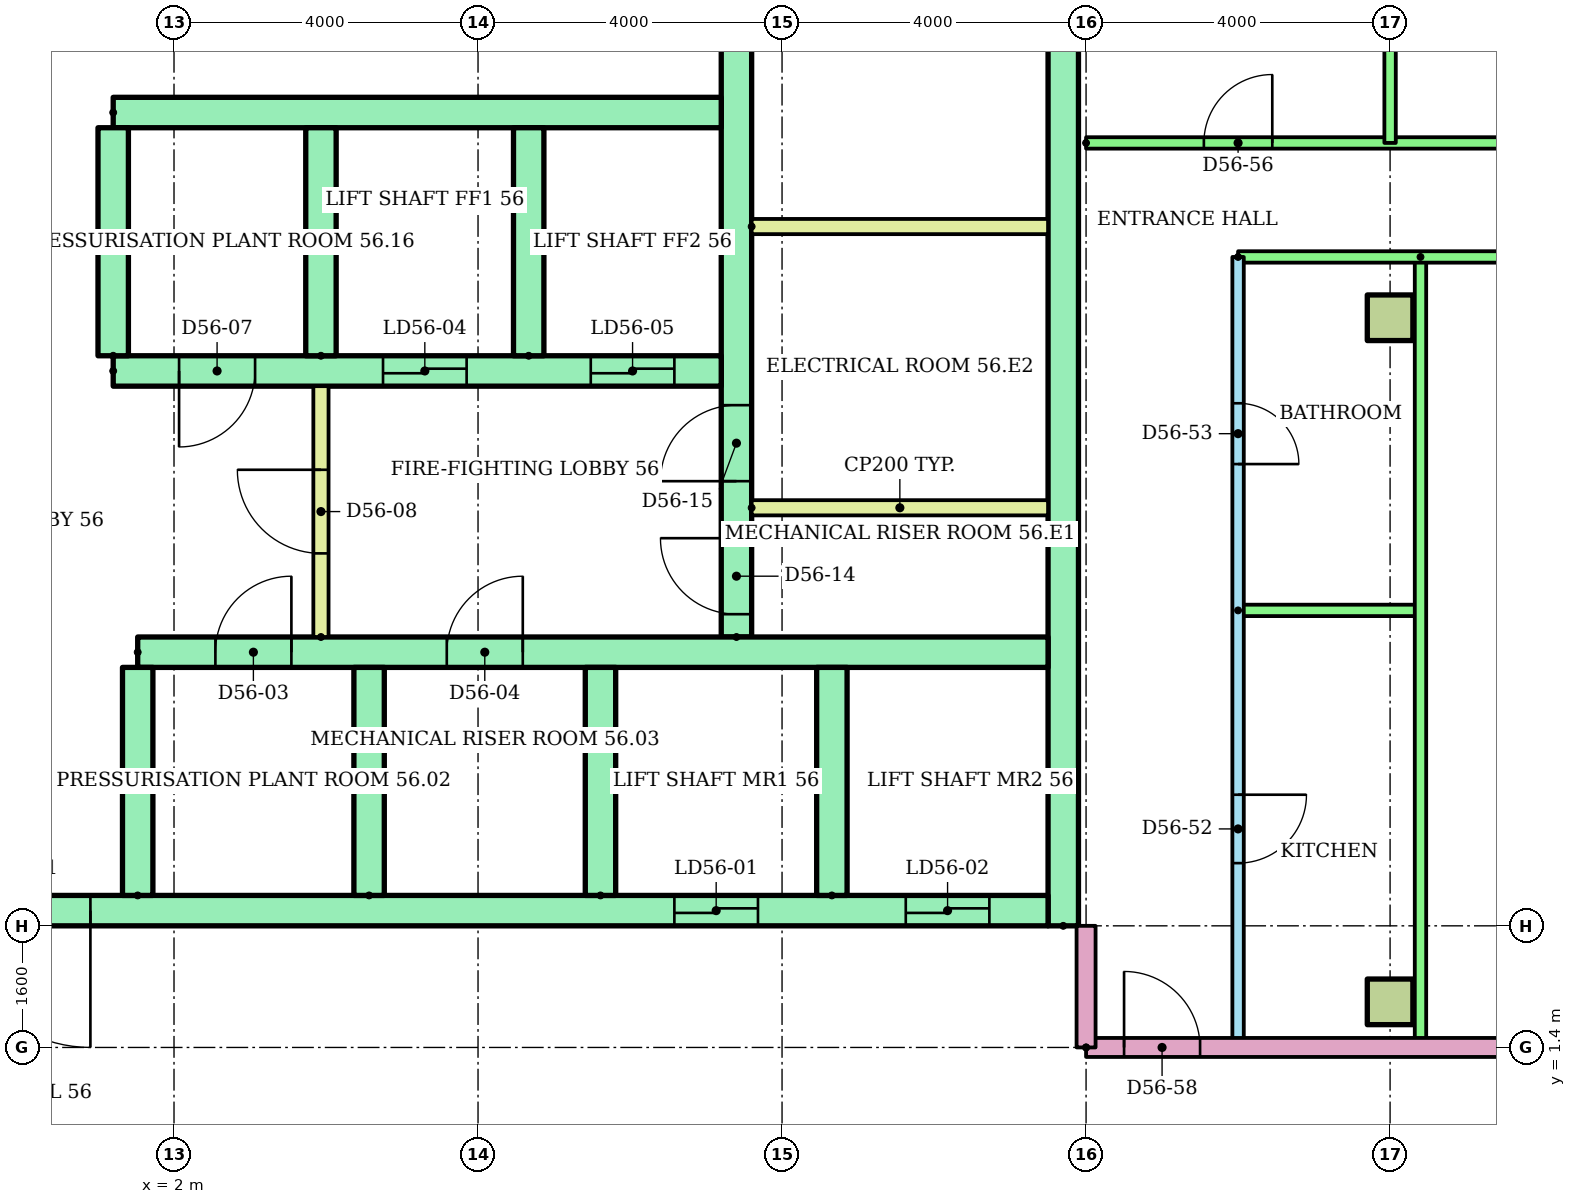
"""IFC4 building model, lengths in metres.
Left out: names, types, materials, properties, quantities, classifications, styles, units other than length and angle.
Written with IfcOpenShell. Run it as: python <this file> out.ifc"""

import sys

from ifc_helpers import new_model, si_unit, direction, frame, frame_2d, origin, origin_2d, place, context, subcontext, project, spatial, rectangle, extrude, element, fill, save


model = new_model("IFC4")
c1 = context("Model", 3, precision=1e-05, world=origin(), true_north=direction((0.0, 1.0)))
c2 = subcontext(c1, "Body", "Model", "MODEL_VIEW")
j1 = project(units=[si_unit("LENGTHUNIT", "METRE"), si_unit("PLANEANGLEUNIT", "RADIAN")], contexts=[c1])
p1 = place(None, origin())
s1 = spatial("IfcSite", under=j1, at=p1, CompositionType="ELEMENT")
p2 = place(p1, origin())
s2 = spatial("IfcBuilding", under=s1, at=p2, CompositionType="ELEMENT")
p3 = place(p2, frame((0.0, 0.0, 217.2)))
s3 = spatial("IfcBuildingStorey", under=s2, at=p3, CompositionType="ELEMENT", Elevation=217.2)
for number, where in (
    (1, (18.0, 2.0, 0.0)),
    (2, (18.0, 11.0, 0.0)),
):
    element("IfcColumn", number, at=place(p3, frame(where)), inside=s3, PredefinedType="COLUMN", context=c2, shape_type="SweptSolid", body=[
        extrude(rectangle(XDim=0.6, YDim=0.6, at=origin_2d()), origin(), (0.0, 0.0, 1.0), 3.2),
    ])
p4 = place(p3, frame((13.7, 3.0, 0.0), z_axis=(0.0, 0.0, 1.0), x_axis=(0.0, 1.0, 0.0)))
e3 = element("IfcWall", 3, at=p4, inside=s3, PredefinedType="SHEAR", context=c2, shape_type="SweptSolid", body=[
    extrude(rectangle(XDim=17.0, YDim=0.4, at=frame_2d((8.5, 0.0))), origin(), (0.0, 0.0, 1.0), 2.92),
])
p5 = place(p3, frame((9.4, 6.8, 0.0), z_axis=(0.0, 0.0, 1.0), x_axis=(0.0, 1.0, 0.0)))
e4 = element("IfcWall", 4, at=p5, inside=s3, PredefinedType="SHEAR", context=c2, shape_type="SweptSolid", body=[
    extrude(rectangle(XDim=12.7, YDim=0.4, at=frame_2d((6.35, 0.0))), origin(), (0.0, 0.0, 1.0), 2.92),
])
p6 = place(p5, frame((0.3, 0.0, 0.0)))
e5 = element("IfcOpeningElement", 5, at=p6, cuts=e4, PredefinedType="OPENING", context=c2, shape_type="SweptSolid", body=[
    extrude(rectangle(XDim=1.0, YDim=2.1, at=frame_2d((0.5, 1.05))), frame((0.0, 0.21, 0.0), z_axis=(0.0, -1.0, 0.0), x_axis=(1.0, 0.0, 0.0)), (0.0, 0.0, 1.0), 0.42),
])
p7 = place(p5, frame((2.05, 0.0, 0.0)))
e6 = element("IfcOpeningElement", 6, at=p7, cuts=e4, PredefinedType="OPENING", context=c2, shape_type="SweptSolid", body=[
    extrude(rectangle(XDim=1.0, YDim=2.1, at=frame_2d((0.5, 1.05))), frame((0.0, 0.21, 0.0), z_axis=(0.0, -1.0, 0.0), x_axis=(1.0, 0.0, 0.0)), (0.0, 0.0, 1.0), 0.42),
])
p8 = place(p5, frame((7.925, 0.0, 0.0)))
e7 = element("IfcOpeningElement", 7, at=p8, cuts=e4, PredefinedType="OPENING", context=c2, shape_type="SweptSolid", body=[
    extrude(rectangle(XDim=1.0, YDim=2.1, at=frame_2d((0.5, 1.05))), frame((0.0, 0.21, 0.0), z_axis=(0.0, -1.0, 0.0), x_axis=(1.0, 0.0, 0.0)), (0.0, 0.0, 1.0), 0.42),
])
p9 = place(p3, frame((-13.5, 3.2, 0.0)))
e8 = element("IfcWall", 8, at=p9, inside=s3, PredefinedType="SHEAR", context=c2, shape_type="SweptSolid", body=[
    extrude(rectangle(XDim=27.0, YDim=0.4, at=frame_2d((13.5, 0.0))), origin(), (0.0, 0.0, 1.0), 2.92),
])
p10 = place(p9, frame((22.083, 0.0, 0.0)))
e9 = element("IfcOpeningElement", 9, at=p10, cuts=e8, PredefinedType="OPENING", context=c2, shape_type="SweptSolid", body=[
    extrude(rectangle(XDim=1.1, YDim=2.1, at=frame_2d((0.55, 1.05))), frame((0.0, 0.21, 0.0), z_axis=(0.0, -1.0, 0.0), x_axis=(1.0, 0.0, 0.0)), (0.0, 0.0, 1.0), 0.42),
])
p11 = place(p9, frame((25.128, 0.0, 0.0)))
e10 = element("IfcOpeningElement", 10, at=p11, cuts=e8, PredefinedType="OPENING", context=c2, shape_type="SweptSolid", body=[
    extrude(rectangle(XDim=1.1, YDim=2.1, at=frame_2d((0.55, 1.05))), frame((0.0, 0.21, 0.0), z_axis=(0.0, -1.0, 0.0), x_axis=(1.0, 0.0, 0.0)), (0.0, 0.0, 1.0), 0.42),
])
p12 = place(p9, frame((12.6, 0.0, 0.0)))
e11 = element("IfcOpeningElement", 11, at=p12, cuts=e8, PredefinedType="OPENING", context=c2, shape_type="SweptSolid", body=[
    extrude(rectangle(XDim=1.8, YDim=2.1, at=frame_2d((0.9, 1.05))), frame((0.0, 0.21, 0.0), z_axis=(0.0, -1.0, 0.0), x_axis=(1.0, 0.0, 0.0)), (0.0, 0.0, 1.0), 0.42),
])
p13 = place(p3, frame((1.522, 6.6, 0.0)))
e12 = element("IfcWall", 12, at=p13, inside=s3, PredefinedType="SHEAR", context=c2, shape_type="SweptSolid", body=[
    extrude(rectangle(XDim=11.978, YDim=0.4, at=frame_2d((5.989, 0.0))), origin(), (0.0, 0.0, 1.0), 2.92),
])
p14 = place(p13, frame((1.022, 0.0, 0.0)))
e13 = element("IfcOpeningElement", 13, at=p14, cuts=e12, PredefinedType="OPENING", context=c2, shape_type="SweptSolid", body=[
    extrude(rectangle(XDim=1.0, YDim=2.1, at=frame_2d((0.5, 1.05))), frame((0.0, 0.21, 0.0), z_axis=(0.0, -1.0, 0.0), x_axis=(1.0, 0.0, 0.0)), (0.0, 0.0, 1.0), 0.42),
])
p15 = place(p13, frame((4.067, 0.0, 0.0)))
e14 = element("IfcOpeningElement", 14, at=p15, cuts=e12, PredefinedType="OPENING", context=c2, shape_type="SweptSolid", body=[
    extrude(rectangle(XDim=1.0, YDim=2.1, at=frame_2d((0.5, 1.05))), frame((0.0, 0.21, 0.0), z_axis=(0.0, -1.0, 0.0), x_axis=(1.0, 0.0, 0.0)), (0.0, 0.0, 1.0), 0.42),
])
for number, where, z_axis, x_axis in (
    (15, (1.522, 3.4, 0.0), (0.0, 0.0, 1.0), (0.0, 1.0, 0.0)),
    (16, (4.567, 3.4, 0.0), (0.0, 0.0, 1.0), (0.0, 1.0, 0.0)),
    (17, (7.611, 3.4, 0.0), (0.0, 0.0, 1.0), (0.0, 1.0, 0.0)),
    (18, (10.656, 3.4, 0.0), (0.0, 0.0, 1.0), (0.0, 1.0, 0.0)),
):
    element("IfcWall", number, at=place(p3, frame(where, z_axis=z_axis, x_axis=x_axis)), inside=s3, PredefinedType="SHEAR", context=c2, shape_type="SweptSolid", body=[
        extrude(rectangle(XDim=3.0, YDim=0.4, at=frame_2d((1.5, 0.0))), origin(), (0.0, 0.0, 1.0), 2.92),
    ])
p16 = place(p3, frame((1.2, 10.3, 0.0)))
e19 = element("IfcWall", 19, at=p16, inside=s3, PredefinedType="SHEAR", context=c2, shape_type="SweptSolid", body=[
    extrude(rectangle(XDim=8.0, YDim=0.4, at=frame_2d((4.0, 0.0))), origin(), (0.0, 0.0, 1.0), 2.92),
])
p17 = place(p16, frame((3.55, 0.0, 0.0)))
e20 = element("IfcOpeningElement", 20, at=p17, cuts=e19, PredefinedType="OPENING", context=c2, shape_type="SweptSolid", body=[
    extrude(rectangle(XDim=1.1, YDim=2.1, at=frame_2d((0.55, 1.05))), frame((0.0, 0.21, 0.0), z_axis=(0.0, -1.0, 0.0), x_axis=(1.0, 0.0, 0.0)), (0.0, 0.0, 1.0), 0.42),
])
p18 = place(p16, frame((6.283, 0.0, 0.0)))
e21 = element("IfcOpeningElement", 21, at=p18, cuts=e19, PredefinedType="OPENING", context=c2, shape_type="SweptSolid", body=[
    extrude(rectangle(XDim=1.1, YDim=2.1, at=frame_2d((0.55, 1.05))), frame((0.0, 0.21, 0.0), z_axis=(0.0, -1.0, 0.0), x_axis=(1.0, 0.0, 0.0)), (0.0, 0.0, 1.0), 0.42),
])
p19 = place(p16, frame((0.867, 0.0, 0.0)))
e22 = element("IfcOpeningElement", 22, at=p19, cuts=e19, PredefinedType="OPENING", context=c2, shape_type="SweptSolid", body=[
    extrude(rectangle(XDim=1.0, YDim=2.1, at=frame_2d((0.5, 1.05))), frame((0.0, 0.21, 0.0), z_axis=(0.0, -1.0, 0.0), x_axis=(1.0, 0.0, 0.0)), (0.0, 0.0, 1.0), 0.42),
])
p20 = place(p3, frame((1.2, 13.7, 0.0)))
e23 = element("IfcWall", 23, at=p20, inside=s3, PredefinedType="SHEAR", context=c2, shape_type="SweptSolid", body=[
    extrude(rectangle(XDim=8.0, YDim=0.4, at=frame_2d((4.0, 0.0))), origin(), (0.0, 0.0, 1.0), 2.92),
])
for number, where, z_axis, x_axis in (
    (24, (1.2, 10.5, 0.0), (0.0, 0.0, 1.0), (0.0, 1.0, 0.0)),
    (25, (3.933, 10.5, 0.0), (0.0, 0.0, 1.0), (0.0, 1.0, 0.0)),
    (26, (6.667, 10.5, 0.0), (0.0, 0.0, 1.0), (0.0, 1.0, 0.0)),
):
    element("IfcWall", number, at=place(p3, frame(where, z_axis=z_axis, x_axis=x_axis)), inside=s3, PredefinedType="SHEAR", context=c2, shape_type="SweptSolid", body=[
        extrude(rectangle(XDim=3.0, YDim=0.4, at=frame_2d((1.5, 0.0))), origin(), (0.0, 0.0, 1.0), 2.92),
    ])
p21 = place(p3, frame((3.933, 6.8, 0.0), z_axis=(0.0, 0.0, 1.0), x_axis=(0.0, 1.0, 0.0)))
e27 = element("IfcWall", 27, at=p21, inside=s3, PredefinedType="PARTITIONING", context=c2, shape_type="SweptSolid", body=[
    extrude(rectangle(XDim=3.3, YDim=0.2, at=frame_2d((1.65, 0.0))), origin(), (0.0, 0.0, 1.0), 2.92),
])
p22 = place(p21, frame((1.1, 0.0, 0.0)))
e28 = element("IfcOpeningElement", 28, at=p22, cuts=e27, PredefinedType="OPENING", context=c2, shape_type="SweptSolid", body=[
    extrude(rectangle(XDim=1.1, YDim=2.1, at=frame_2d((0.55, 1.05))), frame((0.0, 0.11, 0.0), z_axis=(0.0, -1.0, 0.0), x_axis=(1.0, 0.0, 0.0)), (0.0, 0.0, 1.0), 0.22),
])
for number, where in (
    (29, (9.6, 8.5, 0.0)),
    (30, (9.6, 12.2, 0.0)),
):
    element("IfcWall", number, at=place(p3, frame(where)), inside=s3, PredefinedType="PARTITIONING", context=c2, shape_type="SweptSolid", body=[
        extrude(rectangle(XDim=3.9, YDim=0.2, at=frame_2d((1.95, 0.0))), origin(), (0.0, 0.0, 1.0), 2.92),
    ])
p23 = place(p3, frame((16.0, 11.8, 0.0), z_axis=(0.0, 0.0, 1.0), x_axis=(0.0, -1.0, 0.0)))
e31 = element("IfcWall", 31, at=p23, inside=s3, PredefinedType="PARTITIONING", context=c2, shape_type="SweptSolid", body=[
    extrude(rectangle(XDim=10.4, YDim=0.15, at=frame_2d((5.2, 0.0))), origin(), (0.0, 0.0, 1.0), 2.4),
])
p24 = place(p23, frame((7.075, 0.0, 0.0)))
e32 = element("IfcOpeningElement", 32, at=p24, cuts=e31, PredefinedType="OPENING", context=c2, shape_type="SweptSolid", body=[
    extrude(rectangle(XDim=0.9, YDim=2.1, at=frame_2d((0.45, 1.05))), frame((0.0, 0.085, 0.0), z_axis=(0.0, -1.0, 0.0), x_axis=(1.0, 0.0, 0.0)), (0.0, 0.0, 1.0), 0.17),
])
p25 = place(p23, frame((1.925, 0.0, 0.0)))
e33 = element("IfcOpeningElement", 33, at=p25, cuts=e31, PredefinedType="OPENING", context=c2, shape_type="SweptSolid", body=[
    extrude(rectangle(XDim=0.8, YDim=2.1, at=frame_2d((0.4, 1.05))), frame((0.0, 0.085, 0.0), z_axis=(0.0, -1.0, 0.0), x_axis=(1.0, 0.0, 0.0)), (0.0, 0.0, 1.0), 0.17),
])
p26 = place(p3, frame((16.0, 7.15, 0.0)))
e34 = element("IfcWall", 34, at=p26, inside=s3, PredefinedType="PARTITIONING", context=c2, shape_type="SweptSolid", body=[
    extrude(rectangle(XDim=2.4, YDim=0.15, at=frame_2d((1.2, 0.0))), origin(), (0.0, 0.0, 1.0), 2.4),
])
p27 = place(p3, frame((18.4, 11.8, 0.0), z_axis=(0.0, 0.0, 1.0), x_axis=(0.0, -1.0, 0.0)))
e35 = element("IfcWall", 35, at=p27, inside=s3, PredefinedType="PARTITIONING", context=c2, shape_type="SweptSolid", body=[
    extrude(rectangle(XDim=10.4, YDim=0.15, at=frame_2d((5.2, 0.0))), origin(), (0.0, 0.0, 1.0), 2.4),
])
p28 = place(p3, frame((28.92, 11.8, 0.0), z_axis=(0.0, 0.0, 1.0), x_axis=(-1.0, 0.0, 0.0)))
e36 = element("IfcWall", 36, at=p28, inside=s3, PredefinedType="PARTITIONING", context=c2, shape_type="SweptSolid", body=[
    extrude(rectangle(XDim=12.92, YDim=0.15, at=frame_2d((6.46, 0.0))), origin(), (0.0, 0.0, 1.0), 2.4),
])
p29 = place(p28, frame((7.945, 0.0, 0.0)))
e37 = element("IfcOpeningElement", 37, at=p29, cuts=e36, PredefinedType="OPENING", context=c2, shape_type="SweptSolid", body=[
    extrude(rectangle(XDim=0.9, YDim=2.1, at=frame_2d((0.45, 1.05))), frame((0.0, 0.085, 0.0), z_axis=(0.0, -1.0, 0.0), x_axis=(1.0, 0.0, 0.0)), (0.0, 0.0, 1.0), 0.17),
])
p30 = place(p28, frame((3.396, 0.0, 0.0)))
e38 = element("IfcOpeningElement", 38, at=p30, cuts=e36, PredefinedType="OPENING", context=c2, shape_type="SweptSolid", body=[
    extrude(rectangle(XDim=0.9, YDim=2.1, at=frame_2d((0.45, 1.05))), frame((0.0, 0.085, 0.0), z_axis=(0.0, -1.0, 0.0), x_axis=(1.0, 0.0, 0.0)), (0.0, 0.0, 1.0), 0.17),
])
p31 = place(p3, frame((14.0, 13.3, 0.0)))
e39 = element("IfcWall", 39, at=p31, inside=s3, PredefinedType="PARTITIONING", context=c2, shape_type="SweptSolid", body=[
    extrude(rectangle(XDim=14.92, YDim=0.15, at=frame_2d((7.46, 0.0))), origin(), (0.0, 0.0, 1.0), 2.4),
])
p32 = place(p31, frame((1.55, 0.0, 0.0)))
e40 = element("IfcOpeningElement", 40, at=p32, cuts=e39, PredefinedType="OPENING", context=c2, shape_type="SweptSolid", body=[
    extrude(rectangle(XDim=0.9, YDim=2.1, at=frame_2d((0.45, 1.05))), frame((0.0, 0.085, 0.0), z_axis=(0.0, -1.0, 0.0), x_axis=(1.0, 0.0, 0.0)), (0.0, 0.0, 1.0), 0.17),
])
p33 = place(p31, frame((8.85, 0.0, 0.0)))
e41 = element("IfcOpeningElement", 41, at=p33, cuts=e39, PredefinedType="OPENING", context=c2, shape_type="SweptSolid", body=[
    extrude(rectangle(XDim=1.0, YDim=2.1, at=frame_2d((0.5, 1.05))), frame((0.0, 0.085, 0.0), z_axis=(0.0, -1.0, 0.0), x_axis=(1.0, 0.0, 0.0)), (0.0, 0.0, 1.0), 0.17),
])
p34 = place(p3, frame((18.0, 18.921, 0.0), z_axis=(0.0, 0.0, 1.0), x_axis=(0.0, -1.0, 0.0)))
e42 = element("IfcWall", 42, at=p34, inside=s3, PredefinedType="PARTITIONING", context=c2, shape_type="SweptSolid", body=[
    extrude(rectangle(XDim=5.621, YDim=0.15, at=frame_2d((2.811, 0.0))), origin(), (0.0, 0.0, 1.0), 2.4),
])
p35 = place(p3, frame((14.0, 1.4, 0.0)))
e43 = element("IfcWall", 43, at=p35, inside=s3, PredefinedType="PARTITIONING", context=c2, shape_type="SweptSolid", body=[
    extrude(rectangle(XDim=14.92, YDim=0.25, at=frame_2d((7.46, 0.0))), origin(), (0.0, 0.0, 1.0), 2.4),
])
p36 = place(p35, frame((0.5, 0.0, 0.0)))
e44 = element("IfcOpeningElement", 44, at=p36, cuts=e43, PredefinedType="OPENING", context=c2, shape_type="SweptSolid", body=[
    extrude(rectangle(XDim=1.0, YDim=2.1, at=frame_2d((0.5, 1.05))), frame((0.0, 0.135, 0.0), z_axis=(0.0, -1.0, 0.0), x_axis=(1.0, 0.0, 0.0)), (0.0, 0.0, 1.0), 0.27),
])
p37 = place(p3, frame((14.0, 1.4, 0.0), z_axis=(0.0, 0.0, 1.0), x_axis=(0.0, 1.0, 0.0)))
e45 = element("IfcWall", 45, at=p37, inside=s3, PredefinedType="PARTITIONING", context=c2, shape_type="SweptSolid", body=[
    extrude(rectangle(XDim=1.6, YDim=0.25, at=frame_2d((0.8, 0.0))), origin(), (0.0, 0.0, 1.0), 2.4),
])
p38 = place(p10, origin())
e46 = element("IfcDoor", 46, at=p38, inside=s3, OperationType="SLIDING_TO_LEFT", PredefinedType="DOOR", context=c2, shape_type="SweptSolid", body=[
    extrude(rectangle(XDim=1.1, YDim=2.1, at=frame_2d((0.55, 1.05))), frame((0.0, 0.025, 0.0), z_axis=(0.0, -1.0, 0.0), x_axis=(1.0, 0.0, 0.0)), (0.0, 0.0, 1.0), 0.05),
])
fill(e9, e46)
p39 = place(p11, origin())
e47 = element("IfcDoor", 47, at=p39, inside=s3, OperationType="SLIDING_TO_LEFT", PredefinedType="DOOR", context=c2, shape_type="SweptSolid", body=[
    extrude(rectangle(XDim=1.1, YDim=2.1, at=frame_2d((0.55, 1.05))), frame((0.0, 0.025, 0.0), z_axis=(0.0, -1.0, 0.0), x_axis=(1.0, 0.0, 0.0)), (0.0, 0.0, 1.0), 0.05),
])
fill(e10, e47)
p40 = place(p12, frame((1.8, 0.0, 0.0), z_axis=(0.0, 0.0, 1.0), x_axis=(-1.0, 0.0, 0.0)))
e48 = element("IfcDoor", 48, at=p40, inside=s3, OperationType="DOUBLE_DOOR_SINGLE_SWING", PredefinedType="DOOR", context=c2, shape_type="SweptSolid", body=[
    extrude(rectangle(XDim=1.8, YDim=2.1, at=frame_2d((0.9, 1.05))), frame((0.0, 0.025, 0.0), z_axis=(0.0, -1.0, 0.0), x_axis=(1.0, 0.0, 0.0)), (0.0, 0.0, 1.0), 0.05),
])
fill(e11, e48)
p41 = place(p14, origin())
e49 = element("IfcDoor", 49, at=p41, inside=s3, OperationType="SINGLE_SWING_RIGHT", PredefinedType="DOOR", context=c2, shape_type="SweptSolid", body=[
    extrude(rectangle(XDim=1.0, YDim=2.1, at=frame_2d((0.5, 1.05))), frame((0.0, 0.025, 0.0), z_axis=(0.0, -1.0, 0.0), x_axis=(1.0, 0.0, 0.0)), (0.0, 0.0, 1.0), 0.05),
])
fill(e13, e49)
p42 = place(p15, origin())
e50 = element("IfcDoor", 50, at=p42, inside=s3, OperationType="SINGLE_SWING_RIGHT", PredefinedType="DOOR", context=c2, shape_type="SweptSolid", body=[
    extrude(rectangle(XDim=1.0, YDim=2.1, at=frame_2d((0.5, 1.05))), frame((0.0, 0.025, 0.0), z_axis=(0.0, -1.0, 0.0), x_axis=(1.0, 0.0, 0.0)), (0.0, 0.0, 1.0), 0.05),
])
fill(e14, e50)
p43 = place(p17, origin())
e51 = element("IfcDoor", 51, at=p43, inside=s3, OperationType="SLIDING_TO_LEFT", PredefinedType="DOOR", context=c2, shape_type="SweptSolid", body=[
    extrude(rectangle(XDim=1.1, YDim=2.1, at=frame_2d((0.55, 1.05))), frame((0.0, 0.025, 0.0), z_axis=(0.0, -1.0, 0.0), x_axis=(1.0, 0.0, 0.0)), (0.0, 0.0, 1.0), 0.05),
])
fill(e20, e51)
p44 = place(p18, origin())
e52 = element("IfcDoor", 52, at=p44, inside=s3, OperationType="SLIDING_TO_LEFT", PredefinedType="DOOR", context=c2, shape_type="SweptSolid", body=[
    extrude(rectangle(XDim=1.1, YDim=2.1, at=frame_2d((0.55, 1.05))), frame((0.0, 0.025, 0.0), z_axis=(0.0, -1.0, 0.0), x_axis=(1.0, 0.0, 0.0)), (0.0, 0.0, 1.0), 0.05),
])
fill(e21, e52)
p45 = place(p19, frame((1.0, 0.0, 0.0), z_axis=(0.0, 0.0, 1.0), x_axis=(-1.0, 0.0, 0.0)))
e53 = element("IfcDoor", 53, at=p45, inside=s3, OperationType="SINGLE_SWING_LEFT", PredefinedType="DOOR", context=c2, shape_type="SweptSolid", body=[
    extrude(rectangle(XDim=1.0, YDim=2.1, at=frame_2d((0.5, 1.05))), frame((0.0, 0.025, 0.0), z_axis=(0.0, -1.0, 0.0), x_axis=(1.0, 0.0, 0.0)), (0.0, 0.0, 1.0), 0.05),
])
fill(e22, e53)
p46 = place(p22, origin())
e54 = element("IfcDoor", 54, at=p46, inside=s3, OperationType="SINGLE_SWING_RIGHT", PredefinedType="DOOR", context=c2, shape_type="SweptSolid", body=[
    extrude(rectangle(XDim=1.1, YDim=2.1, at=frame_2d((0.55, 1.05))), frame((0.0, 0.025, 0.0), z_axis=(0.0, -1.0, 0.0), x_axis=(1.0, 0.0, 0.0)), (0.0, 0.0, 1.0), 0.05),
])
fill(e28, e54)
p47 = place(p6, origin())
e55 = element("IfcDoor", 55, at=p47, inside=s3, OperationType="SINGLE_SWING_RIGHT", PredefinedType="DOOR", context=c2, shape_type="SweptSolid", body=[
    extrude(rectangle(XDim=1.0, YDim=2.1, at=frame_2d((0.5, 1.05))), frame((0.0, 0.025, 0.0), z_axis=(0.0, -1.0, 0.0), x_axis=(1.0, 0.0, 0.0)), (0.0, 0.0, 1.0), 0.05),
])
fill(e5, e55)
p48 = place(p7, origin())
e56 = element("IfcDoor", 56, at=p48, inside=s3, OperationType="SINGLE_SWING_LEFT", PredefinedType="DOOR", context=c2, shape_type="SweptSolid", body=[
    extrude(rectangle(XDim=1.0, YDim=2.1, at=frame_2d((0.5, 1.05))), frame((0.0, 0.025, 0.0), z_axis=(0.0, -1.0, 0.0), x_axis=(1.0, 0.0, 0.0)), (0.0, 0.0, 1.0), 0.05),
])
fill(e6, e56)
p49 = place(p24, origin())
e57 = element("IfcDoor", 57, at=p49, inside=s3, OperationType="SINGLE_SWING_LEFT", PredefinedType="DOOR", context=c2, shape_type="SweptSolid", body=[
    extrude(rectangle(XDim=0.9, YDim=2.1, at=frame_2d((0.45, 1.05))), frame((0.0, 0.025, 0.0), z_axis=(0.0, -1.0, 0.0), x_axis=(1.0, 0.0, 0.0)), (0.0, 0.0, 1.0), 0.05),
])
fill(e32, e57)
p50 = place(p25, origin())
e58 = element("IfcDoor", 58, at=p50, inside=s3, OperationType="SINGLE_SWING_RIGHT", PredefinedType="DOOR", context=c2, shape_type="SweptSolid", body=[
    extrude(rectangle(XDim=0.8, YDim=2.1, at=frame_2d((0.4, 1.05))), frame((0.0, 0.025, 0.0), z_axis=(0.0, -1.0, 0.0), x_axis=(1.0, 0.0, 0.0)), (0.0, 0.0, 1.0), 0.05),
])
fill(e33, e58)
p51 = place(p32, origin())
e59 = element("IfcDoor", 59, at=p51, inside=s3, OperationType="SINGLE_SWING_RIGHT", PredefinedType="DOOR", context=c2, shape_type="SweptSolid", body=[
    extrude(rectangle(XDim=0.9, YDim=2.1, at=frame_2d((0.45, 1.05))), frame((0.0, 0.025, 0.0), z_axis=(0.0, -1.0, 0.0), x_axis=(1.0, 0.0, 0.0)), (0.0, 0.0, 1.0), 0.05),
])
fill(e40, e59)
p52 = place(p36, origin())
e60 = element("IfcDoor", 60, at=p52, inside=s3, OperationType="SINGLE_SWING_LEFT", PredefinedType="DOOR", context=c2, shape_type="SweptSolid", body=[
    extrude(rectangle(XDim=1.0, YDim=2.1, at=frame_2d((0.5, 1.05))), frame((0.0, 0.025, 0.0), z_axis=(0.0, -1.0, 0.0), x_axis=(1.0, 0.0, 0.0)), (0.0, 0.0, 1.0), 0.05),
])
fill(e44, e60)
save(model, sys.argv[1])
